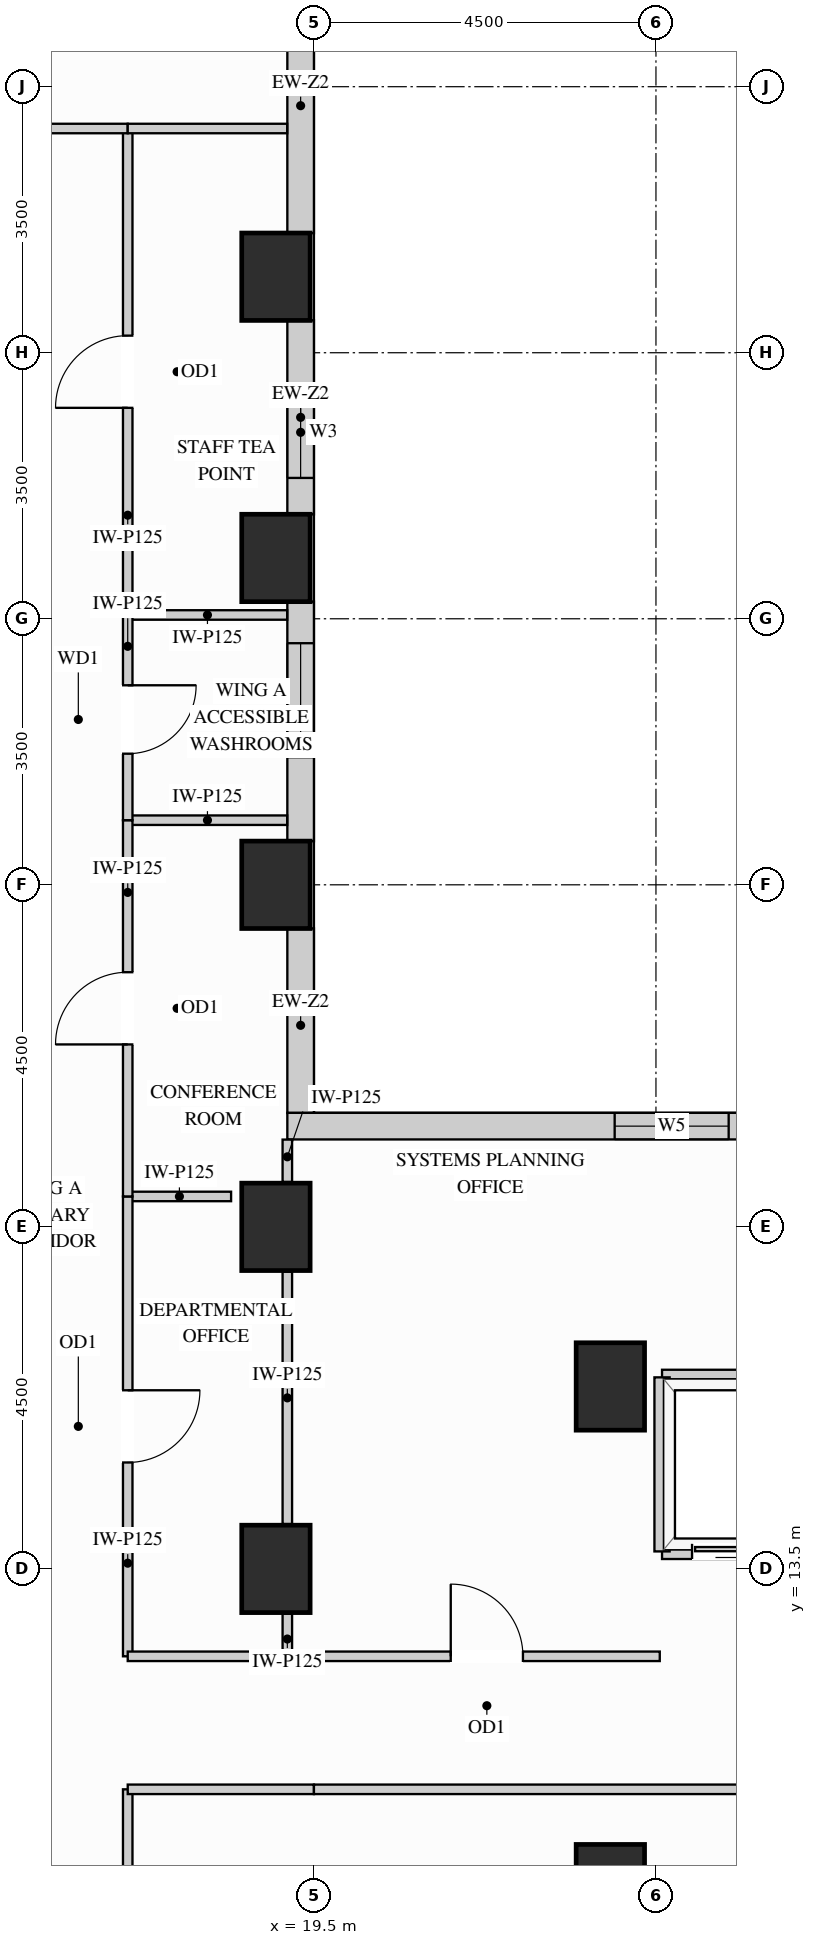
"""IFC4 building model, lengths in metres.
Left out: names, types, materials, properties, quantities, classifications, styles, units other than length and angle.
Written with IfcOpenShell. Run it as: python <this file> out.ifc"""

import sys

from ifc_helpers import new_model, si_unit, direction, frame, frame_2d, origin, origin_2d, place, context, subcontext, project, spatial, rectangle, extrude, source, transform, mapped, element, fill, save


model = new_model("IFC4")
c1 = context("Model", 3, precision=1e-05, world=origin(), true_north=direction((0.0, 1.0)))
c2 = subcontext(c1, "Body", "Model", "MODEL_VIEW")
j1 = project(units=[si_unit("LENGTHUNIT", "METRE"), si_unit("PLANEANGLEUNIT", "RADIAN")], contexts=[c1])
p1 = place(None, origin())
s1 = spatial("IfcSite", under=j1, at=p1, CompositionType="ELEMENT")
p2 = place(p1, origin())
s2 = spatial("IfcBuilding", under=s1, at=p2, CompositionType="ELEMENT")
p3 = place(p2, frame((0.0, 0.0, 106.2)))
s3 = spatial("IfcBuildingStorey", under=s2, at=p3, CompositionType="ELEMENT", Elevation=106.2)
m1 = source(origin(), c2, "Body", "SweptSolid", [
    extrude(rectangle(XDim=0.9, YDim=1.15, at=origin_2d()), origin(), (0.0, 0.0, 1.0), 3.38),
])
for number, where, z_axis, x_axis in (
    (1, (19.0, 13.5, 0.0), (0.0, 0.0, 1.0), (1.0, 0.0, 0.0)),
    (2, (19.0, 18.0, 0.0), (0.0, 0.0, 1.0), (1.0, 0.0, 0.0)),
    (3, (19.0, 22.5, 0.0), (0.0, 0.0, 1.0), (1.0, 0.0, 0.0)),
    (4, (19.0, 26.8, 0.0), (0.0, 0.0, 1.0), (1.0, 0.0, 0.0)),
    (5, (19.0, 30.5, 0.0), (0.0, 0.0, 1.0), (1.0, 0.0, 0.0)),
    (6, (23.4, 15.9, 0.0), (0.0, 0.0, 1.0), (1.0, 0.0, 0.0)),
    (7, (23.4, 9.3, 0.0), (0.0, 0.0, 1.0), (1.0, 0.0, 0.0)),
):
    element("IfcColumn", number, at=place(p3, frame(where, z_axis=z_axis, x_axis=x_axis)), inside=s3, PredefinedType="COLUMN", context=c2, shape_type="MappedRepresentation", body=[
        mapped(m1, transform((0.0, 0.0, 0.0), x_axis=(1.0, 0.0, 0.0), y_axis=(0.0, 1.0, 0.0), z_axis=(0.0, 0.0, 1.0))),
    ])
m2 = source(origin(), c2, "Body", "SweptSolid", [
    extrude(rectangle(XDim=2.429, YDim=0.35, at=frame_2d((1.214, 0.0))), origin(), (0.0, 0.0, 1.0), 2.519),
])
p4 = place(p3, frame((19.325, 19.498, 0.0), z_axis=(0.0, 0.0, 1.0), x_axis=(0.0, 1.0, 0.0)))
e8 = element("IfcWall", 8, at=p4, inside=s3, PredefinedType="SOLIDWALL", context=c2, shape_type="MappedRepresentation", body=[
    mapped(m2, transform((0.0, 0.0, 0.0), x_axis=(1.0, 0.0, 0.0), y_axis=(0.0, 1.0, 0.0), z_axis=(0.0, 0.0, 1.0))),
])
p5 = place(p3, frame((19.325, 23.073, 0.0), z_axis=(0.0, 0.0, 1.0), x_axis=(0.0, 1.0, 0.0)))
e9 = element("IfcWall", 9, at=p5, inside=s3, PredefinedType="SOLIDWALL", context=c2, shape_type="SweptSolid", body=[
    extrude(rectangle(XDim=3.154, YDim=0.35, at=frame_2d((1.577, 0.0))), origin(), (0.0, 0.0, 1.0), 2.519),
])
p6 = place(p5, frame((1.105, 0.0, 0.78)))
e10 = element("IfcOpeningElement", 10, at=p6, cuts=e9, PredefinedType="OPENING", context=c2, shape_type="SweptSolid", body=[
    extrude(rectangle(XDim=1.5, YDim=1.559, at=frame_2d((0.75, 0.78))), frame((0.0, 0.185, 0.0), z_axis=(0.0, -1.0, 0.0), x_axis=(1.0, 0.0, 0.0)), (0.0, 0.0, 1.0), 0.37),
])
p7 = place(p3, frame((19.325, 27.373, 0.0), z_axis=(0.0, 0.0, 1.0), x_axis=(0.0, 1.0, 0.0)))
e11 = element("IfcWall", 11, at=p7, inside=s3, PredefinedType="SOLIDWALL", context=c2, shape_type="SweptSolid", body=[
    extrude(rectangle(XDim=2.554, YDim=0.35, at=frame_2d((1.277, 0.0))), origin(), (0.0, 0.0, 1.0), 2.519),
])
p8 = place(p7, frame((0.48, 0.0, 0.78)))
e12 = element("IfcOpeningElement", 12, at=p8, cuts=e11, PredefinedType="OPENING", context=c2, shape_type="SweptSolid", body=[
    extrude(rectangle(XDim=1.2, YDim=1.559, at=frame_2d((0.6, 0.78))), frame((0.0, 0.185, 0.0), z_axis=(0.0, -1.0, 0.0), x_axis=(1.0, 0.0, 0.0)), (0.0, 0.0, 1.0), 0.37),
])
m3 = source(origin(), c2, "Body", "SweptSolid", [
    extrude(rectangle(XDim=3.354, YDim=0.35, at=frame_2d((1.677, 0.0))), origin(), (0.0, 0.0, 1.0), 2.519),
])
p9 = place(p3, frame((19.325, 31.073, 0.0), z_axis=(0.0, 0.0, 1.0), x_axis=(0.0, 1.0, 0.0)))
e13 = element("IfcWall", 13, at=p9, inside=s3, PredefinedType="SOLIDWALL", context=c2, shape_type="MappedRepresentation", body=[
    mapped(m3, transform((0.0, 0.0, 0.0), x_axis=(1.0, 0.0, 0.0), y_axis=(0.0, 1.0, 0.0), z_axis=(0.0, 0.0, 1.0))),
])
p10 = place(p3, frame((34.75, 19.325, 0.0), z_axis=(0.0, 0.0, 1.0), x_axis=(-1.0, 0.0, 0.0)))
e14 = element("IfcWall", 14, at=p10, inside=s3, PredefinedType="SOLIDWALL", context=c2, shape_type="SweptSolid", body=[
    extrude(rectangle(XDim=15.6, YDim=0.35, at=frame_2d((7.8, 0.0))), origin(), (0.0, 0.0, 1.0), 3.365),
])
p11 = place(p10, frame((4.307, 0.0, 0.78)))
e15 = element("IfcOpeningElement", 15, at=p11, cuts=e14, PredefinedType="OPENING", context=c2, shape_type="SweptSolid", body=[
    extrude(rectangle(XDim=1.5, YDim=2.0, at=frame_2d((0.75, 1.0))), frame((0.0, 0.185, 0.0), z_axis=(0.0, -1.0, 0.0), x_axis=(1.0, 0.0, 0.0)), (0.0, 0.0, 1.0), 0.37),
])
p12 = place(p10, frame((9.793, 0.0, 0.78)))
e16 = element("IfcOpeningElement", 16, at=p12, cuts=e14, PredefinedType="OPENING", context=c2, shape_type="SweptSolid", body=[
    extrude(rectangle(XDim=1.5, YDim=2.0, at=frame_2d((0.75, 1.0))), frame((0.0, 0.185, 0.0), z_axis=(0.0, -1.0, 0.0), x_axis=(1.0, 0.0, 0.0)), (0.0, 0.0, 1.0), 0.37),
])
m4 = source(origin(), c2, "Body", "SweptSolid", [
    extrude(rectangle(XDim=1.36, YDim=0.125, at=frame_2d((0.68, 0.0))), origin(), (0.0, 0.0, 1.0), 3.365),
])
p13 = place(p3, frame((17.05, 18.4, 0.0), z_axis=(0.0, 0.0, 1.0), x_axis=(1.0, 0.0, 0.0)))
e17 = element("IfcWall", 17, at=p13, inside=s3, PredefinedType="PARTITIONING", context=c2, shape_type="MappedRepresentation", body=[
    mapped(m4, transform((0.0, 0.0, 0.0), x_axis=(1.0, 0.0, 0.0), y_axis=(0.0, 1.0, 0.0), z_axis=(0.0, 0.0, 1.0))),
])
m5 = source(origin(), c2, "Body", "SweptSolid", [
    extrude(rectangle(XDim=2.098, YDim=0.125, at=frame_2d((1.049, 0.0))), origin(), (0.0, 0.0, 1.0), 3.365),
])
for number, where, z_axis, x_axis in (
    (18, (17.05, 23.35, 0.0), (0.0, 0.0, 1.0), (1.0, 0.0, 0.0)),
    (19, (17.05, 26.05, 0.0), (0.0, 0.0, 1.0), (1.0, 0.0, 0.0)),
):
    element("IfcWall", number, at=place(p3, frame(where, z_axis=z_axis, x_axis=x_axis)), inside=s3, PredefinedType="PARTITIONING", context=c2, shape_type="MappedRepresentation", body=[
        mapped(m5, transform((0.0, 0.0, 0.0), x_axis=(1.0, 0.0, 0.0), y_axis=(0.0, 1.0, 0.0), z_axis=(0.0, 0.0, 1.0))),
    ])
m6 = source(origin(), c2, "Body", "SweptSolid", [
    extrude(rectangle(XDim=0.56, YDim=0.125, at=frame_2d((0.28, 0.0))), origin(), (0.0, 0.0, 1.0), 2.677),
])
p14 = place(p3, frame((19.15, 12.35, 0.0), z_axis=(0.0, 0.0, 1.0), x_axis=(0.0, 1.0, 0.0)))
e20 = element("IfcWall", 20, at=p14, inside=s3, PredefinedType="PARTITIONING", context=c2, shape_type="MappedRepresentation", body=[
    mapped(m6, transform((0.0, 0.0, 0.0), x_axis=(1.0, 0.0, 0.0), y_axis=(0.0, 1.0, 0.0), z_axis=(0.0, 0.0, 1.0))),
])
m7 = source(origin(), c2, "Body", "SweptSolid", [
    extrude(rectangle(XDim=3.32, YDim=0.125, at=frame_2d((1.66, 0.0))), origin(), (0.0, 0.0, 1.0), 2.677),
])
p15 = place(p3, frame((19.15, 14.09, 0.0), z_axis=(0.0, 0.0, 1.0), x_axis=(0.0, 1.0, 0.0)))
e21 = element("IfcWall", 21, at=p15, inside=s3, PredefinedType="PARTITIONING", context=c2, shape_type="MappedRepresentation", body=[
    mapped(m7, transform((0.0, 0.0, 0.0), x_axis=(1.0, 0.0, 0.0), y_axis=(0.0, 1.0, 0.0), z_axis=(0.0, 0.0, 1.0))),
])
m8 = source(origin(), c2, "Body", "SweptSolid", [
    extrude(rectangle(XDim=0.558, YDim=0.125, at=frame_2d((0.279, 0.0))), origin(), (0.0, 0.0, 1.0), 2.519),
])
p16 = place(p3, frame((19.15, 18.59, 0.0), z_axis=(0.0, 0.0, 1.0), x_axis=(0.0, 1.0, 0.0)))
e22 = element("IfcWall", 22, at=p16, inside=s3, PredefinedType="PARTITIONING", context=c2, shape_type="MappedRepresentation", body=[
    mapped(m8, transform((0.0, 0.0, 0.0), x_axis=(1.0, 0.0, 0.0), y_axis=(0.0, 1.0, 0.0), z_axis=(0.0, 0.0, 1.0))),
])
p17 = place(p3, frame((17.05, 12.35, 0.0), z_axis=(0.0, 0.0, 1.0), x_axis=(0.0, 1.0, 0.0)))
e23 = element("IfcWall", 23, at=p17, inside=s3, PredefinedType="PARTITIONING", context=c2, shape_type="SweptSolid", body=[
    extrude(rectangle(XDim=6.05, YDim=0.125, at=frame_2d((3.025, 0.0))), origin(), (0.0, 0.0, 1.0), 3.365),
])
p18 = place(p17, frame((2.55, 0.0, 0.0)))
e24 = element("IfcOpeningElement", 24, at=p18, cuts=e23, PredefinedType="OPENING", context=c2, shape_type="SweptSolid", body=[
    extrude(rectangle(XDim=0.95, YDim=2.15, at=frame_2d((0.475, 1.075))), frame((0.0, 0.073, 0.0), z_axis=(0.0, -1.0, 0.0), x_axis=(1.0, 0.0, 0.0)), (0.0, 0.0, 1.0), 0.145),
])
p19 = place(p3, frame((17.05, 18.4, 0.0), z_axis=(0.0, 0.0, 1.0), x_axis=(0.0, 1.0, 0.0)))
e25 = element("IfcWall", 25, at=p19, inside=s3, PredefinedType="PARTITIONING", context=c2, shape_type="SweptSolid", body=[
    extrude(rectangle(XDim=4.95, YDim=0.125, at=frame_2d((2.475, 0.0))), origin(), (0.0, 0.0, 1.0), 3.365),
])
p20 = place(p19, frame((2.0, 0.0, 0.0)))
e26 = element("IfcOpeningElement", 26, at=p20, cuts=e25, PredefinedType="OPENING", context=c2, shape_type="SweptSolid", body=[
    extrude(rectangle(XDim=0.95, YDim=2.15, at=frame_2d((0.475, 1.075))), frame((0.0, 0.073, 0.0), z_axis=(0.0, -1.0, 0.0), x_axis=(1.0, 0.0, 0.0)), (0.0, 0.0, 1.0), 0.145),
])
p21 = place(p3, frame((17.05, 26.05, 0.0), z_axis=(0.0, 0.0, 1.0), x_axis=(0.0, 1.0, 0.0)))
e27 = element("IfcWall", 27, at=p21, inside=s3, PredefinedType="PARTITIONING", context=c2, shape_type="SweptSolid", body=[
    extrude(rectangle(XDim=6.4, YDim=0.125, at=frame_2d((3.2, 0.0))), origin(), (0.0, 0.0, 1.0), 3.365),
])
p22 = place(p21, frame((2.725, 0.0, 0.0)))
e28 = element("IfcOpeningElement", 28, at=p22, cuts=e27, PredefinedType="OPENING", context=c2, shape_type="SweptSolid", body=[
    extrude(rectangle(XDim=0.95, YDim=2.15, at=frame_2d((0.475, 1.075))), frame((0.0, 0.073, 0.0), z_axis=(0.0, -1.0, 0.0), x_axis=(1.0, 0.0, 0.0)), (0.0, 0.0, 1.0), 0.145),
])
p23 = place(p3, frame((17.05, 5.5, 0.0), z_axis=(0.0, 0.0, 1.0), x_axis=(0.0, 1.0, 0.0)))
e29 = element("IfcWall", 29, at=p23, inside=s3, PredefinedType="PARTITIONING", context=c2, shape_type="SweptSolid", body=[
    extrude(rectangle(XDim=5.1, YDim=0.125, at=frame_2d((2.55, 0.0))), origin(), (0.0, 0.0, 1.0), 3.365),
])
p24 = place(p23, frame((2.075, 0.0, 0.0)))
e30 = element("IfcOpeningElement", 30, at=p24, cuts=e29, PredefinedType="OPENING", context=c2, shape_type="SweptSolid", body=[
    extrude(rectangle(XDim=0.95, YDim=2.15, at=frame_2d((0.475, 1.075))), frame((0.0, 0.073, 0.0), z_axis=(0.0, -1.0, 0.0), x_axis=(1.0, 0.0, 0.0)), (0.0, 0.0, 1.0), 0.145),
])
p25 = place(p3, frame((17.05, 23.35, 0.0), z_axis=(0.0, 0.0, 1.0), x_axis=(0.0, 1.0, 0.0)))
e31 = element("IfcWall", 31, at=p25, inside=s3, PredefinedType="PARTITIONING", context=c2, shape_type="SweptSolid", body=[
    extrude(rectangle(XDim=2.7, YDim=0.125, at=frame_2d((1.35, 0.0))), origin(), (0.0, 0.0, 1.0), 3.365),
])
p26 = place(p25, frame((0.875, 0.0, 0.0)))
e32 = element("IfcOpeningElement", 32, at=p26, cuts=e31, PredefinedType="OPENING", context=c2, shape_type="SweptSolid", body=[
    extrude(rectangle(XDim=0.9, YDim=2.15, at=frame_2d((0.45, 1.075))), frame((0.0, 0.073, 0.0), z_axis=(0.0, -1.0, 0.0), x_axis=(1.0, 0.0, 0.0)), (0.0, 0.0, 1.0), 0.145),
])
p27 = place(p3, frame((9.039, 32.45, 0.0), z_axis=(0.0, 0.0, 1.0), x_axis=(1.0, 0.0, 0.0)))
e33 = element("IfcWall", 33, at=p27, inside=s3, PredefinedType="PARTITIONING", context=c2, shape_type="SweptSolid", body=[
    extrude(rectangle(XDim=8.011, YDim=0.125, at=frame_2d((4.005, 0.0))), origin(), (0.0, 0.0, 1.0), 3.365),
])
p28 = place(p27, frame((3.531, 0.0, 0.0)))
e34 = element("IfcOpeningElement", 34, at=p28, cuts=e33, PredefinedType="OPENING", context=c2, shape_type="SweptSolid", body=[
    extrude(rectangle(XDim=0.95, YDim=2.15, at=frame_2d((0.475, 1.075))), frame((0.0, 0.073, 0.0), z_axis=(0.0, -1.0, 0.0), x_axis=(1.0, 0.0, 0.0)), (0.0, 0.0, 1.0), 0.145),
])
p29 = place(p3, frame((17.05, 32.45, 0.0), z_axis=(0.0, 0.0, 1.0), x_axis=(1.0, 0.0, 0.0)))
e35 = element("IfcWall", 35, at=p29, inside=s3, PredefinedType="PARTITIONING", context=c2, shape_type="MappedRepresentation", body=[
    mapped(m5, transform((0.0, 0.0, 0.0), x_axis=(1.0, 0.0, 0.0), y_axis=(0.0, 1.0, 0.0), z_axis=(0.0, 0.0, 1.0))),
])
m9 = source(origin(), c2, "Body", "SweptSolid", [
    extrude(rectangle(XDim=2.45, YDim=0.125, at=frame_2d((1.225, 0.0))), origin(), (0.0, 0.0, 1.0), 3.365),
])
p30 = place(p3, frame((17.05, 12.35, 0.0), z_axis=(0.0, 0.0, 1.0), x_axis=(1.0, 0.0, 0.0)))
e36 = element("IfcWall", 36, at=p30, inside=s3, PredefinedType="PARTITIONING", context=c2, shape_type="MappedRepresentation", body=[
    mapped(m9, transform((0.0, 0.0, 0.0), x_axis=(1.0, 0.0, 0.0), y_axis=(0.0, 1.0, 0.0), z_axis=(0.0, 0.0, 1.0))),
])
p31 = place(p3, frame((19.5, 12.35, 0.0), z_axis=(0.0, 0.0, 1.0), x_axis=(1.0, 0.0, 0.0)))
e37 = element("IfcWall", 37, at=p31, inside=s3, PredefinedType="PARTITIONING", context=c2, shape_type="SweptSolid", body=[
    extrude(rectangle(XDim=4.55, YDim=0.125, at=frame_2d((2.275, 0.0))), origin(), (0.0, 0.0, 1.0), 3.365),
])
p32 = place(p31, frame((1.8, 0.0, 0.0)))
e38 = element("IfcOpeningElement", 38, at=p32, cuts=e37, PredefinedType="OPENING", context=c2, shape_type="SweptSolid", body=[
    extrude(rectangle(XDim=0.95, YDim=2.15, at=frame_2d((0.475, 1.075))), frame((0.0, 0.073, 0.0), z_axis=(0.0, -1.0, 0.0), x_axis=(1.0, 0.0, 0.0)), (0.0, 0.0, 1.0), 0.145),
])
p33 = place(p3, frame((17.05, 10.6, 0.0), z_axis=(0.0, 0.0, 1.0), x_axis=(1.0, 0.0, 0.0)))
e39 = element("IfcWall", 39, at=p33, inside=s3, PredefinedType="PARTITIONING", context=c2, shape_type="MappedRepresentation", body=[
    mapped(m9, transform((0.0, 0.0, 0.0), x_axis=(1.0, 0.0, 0.0), y_axis=(0.0, 1.0, 0.0), z_axis=(0.0, 0.0, 1.0))),
])
p34 = place(p3, frame((19.5, 10.6, 0.0), z_axis=(0.0, 0.0, 1.0), x_axis=(1.0, 0.0, 0.0)))
e40 = element("IfcWall", 40, at=p34, inside=s3, PredefinedType="PARTITIONING", context=c2, shape_type="SweptSolid", body=[
    extrude(rectangle(XDim=14.9, YDim=0.125, at=frame_2d((7.45, 0.0))), origin(), (0.0, 0.0, 1.0), 3.365),
])
p35 = place(p34, frame((6.975, 0.0, 0.0)))
e41 = element("IfcOpeningElement", 41, at=p35, cuts=e40, PredefinedType="OPENING", context=c2, shape_type="SweptSolid", body=[
    extrude(rectangle(XDim=0.95, YDim=2.15, at=frame_2d((0.475, 1.075))), frame((0.0, 0.073, 0.0), z_axis=(0.0, -1.0, 0.0), x_axis=(1.0, 0.0, 0.0)), (0.0, 0.0, 1.0), 0.145),
])
m10 = source(origin(), c2, "Body", "SweptSolid", [
    extrude(rectangle(XDim=1.89, YDim=0.2, at=frame_2d((0.945, 0.0))), origin(), (0.0, 0.0, 1.0), 2.677),
])
p36 = place(p3, frame((24.08, 16.02, 0.0), z_axis=(0.0, 0.0, 1.0), x_axis=(1.0, 0.0, 0.0)))
e42 = element("IfcWall", 42, at=p36, inside=s3, PredefinedType="PARTITIONING", context=c2, shape_type="MappedRepresentation", body=[
    mapped(m10, transform((0.0, 0.0, 0.0), x_axis=(1.0, 0.0, 0.0), y_axis=(0.0, 1.0, 0.0), z_axis=(0.0, 0.0, 1.0))),
])
p37 = place(p3, frame((24.08, 13.73, 0.0), z_axis=(0.0, 0.0, 1.0), x_axis=(1.0, 0.0, 0.0)))
e43 = element("IfcWall", 43, at=p37, inside=s3, PredefinedType="PARTITIONING", context=c2, shape_type="SweptSolid", body=[
    extrude(rectangle(XDim=1.89, YDim=0.2, at=frame_2d((0.945, 0.0))), origin(), (0.0, 0.0, 1.0), 2.446),
])
p38 = place(p37, frame((0.395, 0.0, 0.0)))
e44 = element("IfcOpeningElement", 44, at=p38, cuts=e43, PredefinedType="OPENING", context=c2, shape_type="SweptSolid", body=[
    extrude(rectangle(XDim=1.1, YDim=2.2, at=frame_2d((0.55, 1.1))), frame((0.0, 0.11, 0.0), z_axis=(0.0, -1.0, 0.0), x_axis=(1.0, 0.0, 0.0)), (0.0, 0.0, 1.0), 0.22),
])
m11 = source(origin(), c2, "Body", "SweptSolid", [
    extrude(rectangle(XDim=2.29, YDim=0.2, at=frame_2d((1.145, 0.0))), origin(), (0.0, 0.0, 1.0), 3.365),
])
p39 = place(p3, frame((24.08, 13.73, 0.0), z_axis=(0.0, 0.0, 1.0), x_axis=(0.0, 1.0, 0.0)))
e45 = element("IfcWall", 45, at=p39, inside=s3, PredefinedType="PARTITIONING", context=c2, shape_type="MappedRepresentation", body=[
    mapped(m11, transform((0.0, 0.0, 0.0), x_axis=(1.0, 0.0, 0.0), y_axis=(0.0, 1.0, 0.0), z_axis=(0.0, 0.0, 1.0))),
])
m12 = source(origin(), c2, "Body", "SweptSolid", [
    extrude(rectangle(XDim=1.1, YDim=2.2, at=frame_2d((0.55, 1.1))), frame((0.0, 0.025, 0.0), z_axis=(0.0, -1.0, 0.0), x_axis=(1.0, 0.0, 0.0)), (0.0, 0.0, 1.0), 0.05),
])
p40 = place(p38, origin())
e46 = element("IfcDoor", 46, at=p40, inside=s3, OperationType="SLIDING_TO_LEFT", PredefinedType="DOOR", context=c2, shape_type="MappedRepresentation", body=[
    mapped(m12, transform((0.0, 0.0, 0.0), x_axis=(1.0, 0.0, 0.0), y_axis=(0.0, 1.0, 0.0), z_axis=(0.0, 0.0, 1.0))),
])
fill(e44, e46)
m13 = source(origin(), c2, "Body", "SweptSolid", [
    extrude(rectangle(XDim=0.95, YDim=2.15, at=frame_2d((0.475, 1.075))), frame((0.0, 0.025, 0.0), z_axis=(0.0, -1.0, 0.0), x_axis=(1.0, 0.0, 0.0)), (0.0, 0.0, 1.0), 0.05),
])
p41 = place(p18, origin())
e47 = element("IfcDoor", 47, at=p41, inside=s3, OperationType="SINGLE_SWING_RIGHT", PredefinedType="DOOR", context=c2, shape_type="MappedRepresentation", body=[
    mapped(m13, transform((0.0, 0.0, 0.0), x_axis=(1.0, 0.0, 0.0), y_axis=(0.0, 1.0, 0.0), z_axis=(0.0, 0.0, 1.0))),
])
fill(e24, e47)
p42 = place(p20, origin())
e48 = element("IfcDoor", 48, at=p42, inside=s3, OperationType="SINGLE_SWING_LEFT", PredefinedType="DOOR", context=c2, shape_type="MappedRepresentation", body=[
    mapped(m13, transform((0.0, 0.0, 0.0), x_axis=(1.0, 0.0, 0.0), y_axis=(0.0, 1.0, 0.0), z_axis=(0.0, 0.0, 1.0))),
])
fill(e26, e48)
p43 = place(p22, origin())
e49 = element("IfcDoor", 49, at=p43, inside=s3, OperationType="SINGLE_SWING_LEFT", PredefinedType="DOOR", context=c2, shape_type="MappedRepresentation", body=[
    mapped(m13, transform((0.0, 0.0, 0.0), x_axis=(1.0, 0.0, 0.0), y_axis=(0.0, 1.0, 0.0), z_axis=(0.0, 0.0, 1.0))),
])
fill(e28, e49)
p44 = place(p32, origin())
e50 = element("IfcDoor", 50, at=p44, inside=s3, OperationType="SINGLE_SWING_LEFT", PredefinedType="DOOR", context=c2, shape_type="MappedRepresentation", body=[
    mapped(m13, transform((0.0, 0.0, 0.0), x_axis=(1.0, 0.0, 0.0), y_axis=(0.0, 1.0, 0.0), z_axis=(0.0, 0.0, 1.0))),
])
fill(e38, e50)
m14 = source(origin(), c2, "Body", "SweptSolid", [
    extrude(rectangle(XDim=0.9, YDim=2.15, at=frame_2d((0.45, 1.075))), frame((0.0, 0.025, 0.0), z_axis=(0.0, -1.0, 0.0), x_axis=(1.0, 0.0, 0.0)), (0.0, 0.0, 1.0), 0.05),
])
p45 = place(p26, origin())
e51 = element("IfcDoor", 51, at=p45, inside=s3, OperationType="SINGLE_SWING_RIGHT", PredefinedType="DOOR", context=c2, shape_type="MappedRepresentation", body=[
    mapped(m14, transform((0.0, 0.0, 0.0), x_axis=(1.0, 0.0, 0.0), y_axis=(0.0, 1.0, 0.0), z_axis=(0.0, 0.0, 1.0))),
])
fill(e32, e51)
m15 = source(origin(), c2, "Body", "SweptSolid", [
    extrude(rectangle(XDim=1.2, YDim=1.559, at=frame_2d((0.6, 0.78))), frame((0.0, 0.03, 0.0), z_axis=(0.0, -1.0, 0.0), x_axis=(1.0, 0.0, 0.0)), (0.0, 0.0, 1.0), 0.06),
])
p46 = place(p8, origin())
e52 = element("IfcWindow", 52, at=p46, inside=s3, PartitioningType="SINGLE_PANEL", PredefinedType="WINDOW", context=c2, shape_type="MappedRepresentation", body=[
    mapped(m15, transform((0.0, 0.0, 0.0), x_axis=(1.0, 0.0, 0.0), y_axis=(0.0, 1.0, 0.0), z_axis=(0.0, 0.0, 1.0))),
])
fill(e12, e52)
m16 = source(origin(), c2, "Body", "SweptSolid", [
    extrude(rectangle(XDim=1.5, YDim=1.559, at=frame_2d((0.75, 0.78))), frame((0.0, 0.03, 0.0), z_axis=(0.0, -1.0, 0.0), x_axis=(1.0, 0.0, 0.0)), (0.0, 0.0, 1.0), 0.06),
])
p47 = place(p6, origin())
e53 = element("IfcWindow", 53, at=p47, inside=s3, PartitioningType="SINGLE_PANEL", PredefinedType="WINDOW", context=c2, shape_type="MappedRepresentation", body=[
    mapped(m16, transform((0.0, 0.0, 0.0), x_axis=(1.0, 0.0, 0.0), y_axis=(0.0, 1.0, 0.0), z_axis=(0.0, 0.0, 1.0))),
])
fill(e10, e53)
m17 = source(origin(), c2, "Body", "SweptSolid", [
    extrude(rectangle(XDim=1.5, YDim=2.0, at=frame_2d((0.75, 1.0))), frame((0.0, 0.03, 0.0), z_axis=(0.0, -1.0, 0.0), x_axis=(1.0, 0.0, 0.0)), (0.0, 0.0, 1.0), 0.06),
])
p48 = place(p12, origin())
e54 = element("IfcWindow", 54, at=p48, inside=s3, PartitioningType="SINGLE_PANEL", PredefinedType="WINDOW", context=c2, shape_type="MappedRepresentation", body=[
    mapped(m17, transform((0.0, 0.0, 0.0), x_axis=(1.0, 0.0, 0.0), y_axis=(0.0, 1.0, 0.0), z_axis=(0.0, 0.0, 1.0))),
])
fill(e16, e54)
save(model, sys.argv[1])
